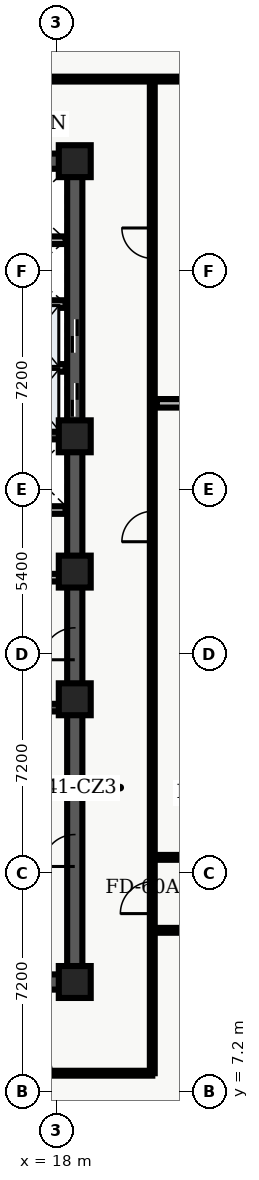
"""IFC4 building model, lengths in metres.
Left out: names, types, materials, properties, quantities, classifications, styles, units other than length and angle.
Written with IfcOpenShell. Run it as: python <this file> out.ifc"""

import sys

from ifc_helpers import new_model, entity, si_unit, converted_unit, direction, frame, origin_with_axes, origin_2d_with_axis, place, context, subcontext, project, spatial, polyline, rectangle, outline, extrude, element, fill, save


model = new_model("IFC4")
c1 = context("Model", 3, precision=1e-05, world=origin_with_axes(), true_north=direction((0.0, 1.0)))
c2 = subcontext(c1, "Body", "Model", "MODEL_VIEW")
j1 = project(units=[si_unit("LENGTHUNIT", "METRE"), converted_unit("PLANEANGLEUNIT", "DEGREE", entity("IfcPlaneAngleMeasure", 0.017), si_unit("PLANEANGLEUNIT", "RADIAN"), dimensions=[0, 0, 0, 0, 0, 0, 0])], contexts=[c1])
p1 = place(None, origin_with_axes())
s1 = spatial("IfcSite", under=j1, at=p1, CompositionType="ELEMENT")
p2 = place(p1, origin_with_axes())
s2 = spatial("IfcBuilding", under=s1, at=p2, CompositionType="ELEMENT")
p3 = place(p2, frame((0.0, 0.0, 168.0), z_axis=(0.0, 0.0, 1.0), x_axis=(1.0, 0.0, 0.0)))
s3 = spatial("IfcBuildingStorey", under=s2, at=p3, CompositionType="ELEMENT", Elevation=168.0)
p4 = place(p3, frame((11.4, 10.8, 0.0), z_axis=(0.0, 0.0, 1.0), x_axis=(1.0, 0.0, 0.0)))
e1 = element("IfcWall", 1, at=p4, inside=s3, PredefinedType="SHEAR", context=c2, shape_type="SweptSolid", body=[
    extrude(outline(polyline([(0.0, -0.25), (7.2, -0.25), (7.2, 0.25), (0.0, 0.25), (0.0, -0.25)])), origin_with_axes(), (0.0, 0.0, 1.0), 3.66),
])
p5 = place(p4, frame((2.625, 0.0, 0.0), z_axis=(0.0, 0.0, 1.0), x_axis=(1.0, 0.0, 0.0)))
e2 = element("IfcOpeningElement", 2, at=p5, cuts=e1, PredefinedType="OPENING", context=c2, shape_type="SweptSolid", body=[
    extrude(rectangle(XDim=1.05, YDim=0.52, at=origin_2d_with_axis()), origin_with_axes(), (0.0, 0.0, 1.0), 2.15),
])
p6 = place(p3, frame((11.4, 37.8, 0.0), z_axis=(0.0, 0.0, 1.0), x_axis=(1.0, 0.0, 0.0)))
e3 = element("IfcWall", 3, at=p6, inside=s3, PredefinedType="SHEAR", context=c2, shape_type="SweptSolid", body=[
    extrude(outline(polyline([(0.0, -0.25), (7.2, -0.25), (7.2, 0.25), (0.0, 0.25), (0.0, -0.25)])), origin_with_axes(), (0.0, 0.0, 1.0), 3.66),
])
p7 = place(p6, frame((2.625, 0.0, 0.0), z_axis=(0.0, 0.0, 1.0), x_axis=(1.0, 0.0, 0.0)))
e4 = element("IfcOpeningElement", 4, at=p7, cuts=e3, PredefinedType="OPENING", context=c2, shape_type="SweptSolid", body=[
    extrude(rectangle(XDim=1.05, YDim=0.52, at=origin_2d_with_axis()), origin_with_axes(), (0.0, 0.0, 1.0), 2.15),
])
p8 = place(p3, frame((18.6, 10.8, 0.0), z_axis=(0.0, 0.0, 1.0), x_axis=(0.0, 1.0, 0.0)))
e5 = element("IfcWall", 5, at=p8, inside=s3, PredefinedType="SHEAR", context=c2, shape_type="SweptSolid", body=[
    extrude(outline(polyline([(0.0, -0.25), (13.5, -0.25), (13.5, 0.25), (0.0, 0.25), (0.0, -0.25)])), origin_with_axes(), (0.0, 0.0, 1.0), 3.66),
])
p9 = place(p8, frame((11.125, 0.0, 0.0), z_axis=(0.0, 0.0, 1.0), x_axis=(1.0, 0.0, 0.0)))
e6 = element("IfcOpeningElement", 6, at=p9, cuts=e5, PredefinedType="OPENING", context=c2, shape_type="SweptSolid", body=[
    extrude(rectangle(XDim=1.05, YDim=0.52, at=origin_2d_with_axis()), origin_with_axes(), (0.0, 0.0, 1.0), 2.15),
])
p10 = place(p8, frame((4.325, 0.0, 0.0), z_axis=(0.0, 0.0, 1.0), x_axis=(1.0, 0.0, 0.0)))
e7 = element("IfcOpeningElement", 7, at=p10, cuts=e5, PredefinedType="OPENING", context=c2, shape_type="SweptSolid", body=[
    extrude(rectangle(XDim=1.05, YDim=0.52, at=origin_2d_with_axis()), origin_with_axes(), (0.0, 0.0, 1.0), 2.15),
])
p11 = place(p3, frame((18.6, 24.3, 0.0), z_axis=(0.0, 0.0, 1.0), x_axis=(0.0, 1.0, 0.0)))
e8 = element("IfcWall", 8, at=p11, inside=s3, PredefinedType="SHEAR", context=c2, shape_type="SweptSolid", body=[
    extrude(outline(polyline([(0.0, -0.25), (13.5, -0.25), (13.5, 0.25), (0.0, 0.25), (0.0, -0.25)])), origin_with_axes(), (0.0, 0.0, 1.0), 3.66),
])
p12 = place(p11, frame((5.65, 0.0, 0.0), z_axis=(0.0, 0.0, 1.0), x_axis=(1.0, 0.0, 0.0)))
e9 = element("IfcOpeningElement", 9, at=p12, cuts=e8, PredefinedType="OPENING", context=c2, shape_type="SweptSolid", body=[
    extrude(rectangle(XDim=1.1, YDim=0.52, at=origin_2d_with_axis()), origin_with_axes(), (0.0, 0.0, 1.0), 2.15),
])
p13 = place(p11, frame((7.75, 0.0, 0.0), z_axis=(0.0, 0.0, 1.0), x_axis=(1.0, 0.0, 0.0)))
e10 = element("IfcOpeningElement", 10, at=p13, cuts=e8, PredefinedType="OPENING", context=c2, shape_type="SweptSolid", body=[
    extrude(rectangle(XDim=1.1, YDim=0.52, at=origin_2d_with_axis()), origin_with_axes(), (0.0, 0.0, 1.0), 2.15),
])
for number, where, z_axis, x_axis in (
    (11, (11.65, 19.825, 0.0), (0.0, 0.0, 1.0), (1.0, 0.0, 0.0)),
    (12, (11.65, 28.775, 0.0), (0.0, 0.0, 1.0), (1.0, 0.0, 0.0)),
):
    element("IfcWall", number, at=place(p3, frame(where, z_axis=z_axis, x_axis=x_axis)), inside=s3, PredefinedType="SHEAR", context=c2, shape_type="SweptSolid", body=[
        extrude(outline(polyline([(0.0, -0.125), (6.7, -0.125), (6.7, 0.125), (0.0, 0.125), (0.0, -0.125)])), origin_with_axes(), (0.0, 0.0, 1.0), 3.66),
    ])
p14 = place(p3, frame((11.7, 24.1, 0.0), z_axis=(0.0, 0.0, 1.0), x_axis=(1.0, 0.0, 0.0)))
e13 = element("IfcWall", 13, at=p14, inside=s3, PredefinedType="SOLIDWALL", context=c2, shape_type="SweptSolid", body=[
    extrude(outline(polyline([(0.0, -0.125), (6.6, -0.125), (6.6, 0.125), (0.0, 0.125), (0.0, -0.125)])), origin_with_axes(), (0.0, 0.0, 1.0), 2.7),
])
p15 = place(p14, frame((3.75, 0.0, 0.0), z_axis=(0.0, 0.0, 1.0), x_axis=(1.0, 0.0, 0.0)))
e14 = element("IfcOpeningElement", 14, at=p15, cuts=e13, PredefinedType="OPENING", context=c2, shape_type="SweptSolid", body=[
    extrude(rectangle(XDim=0.9, YDim=0.27, at=origin_2d_with_axis()), origin_with_axes(), (0.0, 0.0, 1.0), 2.15),
])
p16 = place(p3, frame((11.7, 26.325, 0.0), z_axis=(0.0, 0.0, 1.0), x_axis=(1.0, 0.0, 0.0)))
e15 = element("IfcWall", 15, at=p16, inside=s3, PredefinedType="SOLIDWALL", context=c2, shape_type="SweptSolid", body=[
    extrude(outline(polyline([(0.0, -0.125), (6.6, -0.125), (6.6, 0.125), (0.0, 0.125), (0.0, -0.125)])), origin_with_axes(), (0.0, 0.0, 1.0), 2.7),
])
p17 = place(p16, frame((3.5, 0.0, 0.0), z_axis=(0.0, 0.0, 1.0), x_axis=(1.0, 0.0, 0.0)))
e16 = element("IfcOpeningElement", 16, at=p17, cuts=e15, PredefinedType="OPENING", context=c2, shape_type="SweptSolid", body=[
    extrude(rectangle(XDim=0.9, YDim=0.27, at=origin_2d_with_axis()), origin_with_axes(), (0.0, 0.0, 1.0), 2.15),
])
for number, where, z_axis, x_axis in (
    (17, (18.6, 10.8, 0.0), (0.0, 0.0, 1.0), (1.0, 0.0, 0.0)),
    (18, (18.6, 20.1, 0.0), (0.0, 0.0, 1.0), (1.0, 0.0, 0.0)),
    (19, (18.6, 24.3, 0.0), (0.0, 0.0, 1.0), (1.0, 0.0, 0.0)),
    (20, (18.6, 28.75, 0.0), (0.0, 0.0, 1.0), (1.0, 0.0, 0.0)),
    (21, (18.6, 37.8, 0.0), (0.0, 0.0, 1.0), (1.0, 0.0, 0.0)),
):
    element("IfcColumn", number, at=place(p3, frame(where, z_axis=z_axis, x_axis=x_axis)), inside=s3, PredefinedType="COLUMN", context=c2, shape_type="SweptSolid", body=[
        extrude(rectangle(XDim=1.05, YDim=1.05, at=origin_2d_with_axis()), origin_with_axes(), (0.0, 0.0, 1.0), 3.9),
    ])
for number, where, z_axis, x_axis in (
    (22, (15.84, 31.0, 0.0), (0.0, 0.0, 1.0), (1.0, 0.0, 0.0)),
    (23, (15.84, 33.1, 0.0), (0.0, 0.0, 1.0), (1.0, 0.0, 0.0)),
    (24, (15.84, 35.2, 0.0), (0.0, 0.0, 1.0), (1.0, 0.0, 0.0)),
):
    element("IfcWall", number, at=place(p3, frame(where, z_axis=z_axis, x_axis=x_axis)), inside=s3, PredefinedType="SOLIDWALL", context=c2, shape_type="SweptSolid", body=[
        extrude(outline(polyline([(0.0, -0.125), (2.46, -0.125), (2.46, 0.125), (0.0, 0.125), (0.0, -0.125)])), origin_with_axes(), (0.0, 0.0, 1.0), 2.7),
    ])
p18 = place(p3, frame((2.6, 7.8, 0.0), z_axis=(0.0, 0.0, 1.0), x_axis=(1.0, 0.0, 0.0)))
e25 = element("IfcWall", 25, at=p18, inside=s3, PredefinedType="PARTITIONING", context=c2, shape_type="SweptSolid", body=[
    extrude(outline(polyline([(0.0, -0.08), (18.55, -0.08), (18.55, 0.08), (0.0, 0.08), (0.0, -0.08)])), origin_with_axes(), (0.0, 0.0, 1.0), 2.7),
])
p19 = place(p18, frame((2.551, 0.0, 0.0), z_axis=(0.0, 0.0, 1.0), x_axis=(1.0, 0.0, 0.0)))
e26 = element("IfcOpeningElement", 26, at=p19, cuts=e25, PredefinedType="OPENING", context=c2, shape_type="SweptSolid", body=[
    extrude(rectangle(XDim=1.0, YDim=0.18, at=origin_2d_with_axis()), origin_with_axes(), (0.0, 0.0, 1.0), 2.15),
])
p20 = place(p18, frame((8.065, 0.0, 0.0), z_axis=(0.0, 0.0, 1.0), x_axis=(1.0, 0.0, 0.0)))
e27 = element("IfcOpeningElement", 27, at=p20, cuts=e25, PredefinedType="OPENING", context=c2, shape_type="SweptSolid", body=[
    extrude(rectangle(XDim=1.0, YDim=0.18, at=origin_2d_with_axis()), origin_with_axes(), (0.0, 0.0, 1.0), 2.15),
])
p21 = place(p18, frame((14.758, 0.0, 0.0), z_axis=(0.0, 0.0, 1.0), x_axis=(1.0, 0.0, 0.0)))
e28 = element("IfcOpeningElement", 28, at=p21, cuts=e25, PredefinedType="OPENING", context=c2, shape_type="SweptSolid", body=[
    extrude(rectangle(XDim=1.0, YDim=0.18, at=origin_2d_with_axis()), origin_with_axes(), (0.0, 0.0, 1.0), 2.15),
])
p22 = place(p3, frame((2.6, 40.5, 0.0), z_axis=(0.0, 0.0, 1.0), x_axis=(1.0, 0.0, 0.0)))
e29 = element("IfcWall", 29, at=p22, inside=s3, PredefinedType="PARTITIONING", context=c2, shape_type="SweptSolid", body=[
    extrude(outline(polyline([(0.0, -0.08), (21.324, -0.08), (21.324, 0.08), (0.0, 0.08), (0.0, -0.08)])), origin_with_axes(), (0.0, 0.0, 1.0), 2.7),
])
p23 = place(p22, frame((4.395, 0.0, 0.0), z_axis=(0.0, 0.0, 1.0), x_axis=(1.0, 0.0, 0.0)))
e30 = element("IfcOpeningElement", 30, at=p23, cuts=e29, PredefinedType="OPENING", context=c2, shape_type="SweptSolid", body=[
    extrude(rectangle(XDim=1.2, YDim=0.18, at=origin_2d_with_axis()), origin_with_axes(), (0.0, 0.0, 1.0), 2.2),
])
p24 = place(p22, frame((13.16, 0.0, 0.0), z_axis=(0.0, 0.0, 1.0), x_axis=(1.0, 0.0, 0.0)))
e31 = element("IfcOpeningElement", 31, at=p24, cuts=e29, PredefinedType="OPENING", context=c2, shape_type="SweptSolid", body=[
    extrude(rectangle(XDim=1.0, YDim=0.18, at=origin_2d_with_axis()), origin_with_axes(), (0.0, 0.0, 1.0), 2.15),
])
p25 = place(p3, frame((21.15, 7.8, 0.0), z_axis=(0.0, 0.0, 1.0), x_axis=(0.0, 1.0, 0.0)))
e32 = element("IfcWall", 32, at=p25, inside=s3, PredefinedType="PARTITIONING", context=c2, shape_type="SweptSolid", body=[
    extrude(outline(polyline([(0.0, -0.08), (32.7, -0.08), (32.7, 0.08), (0.0, 0.08), (0.0, -0.08)])), origin_with_axes(), (0.0, 0.0, 1.0), 2.7),
])
p26 = place(p25, frame((17.983, 0.0, 0.0), z_axis=(0.0, 0.0, 1.0), x_axis=(1.0, 0.0, 0.0)))
e33 = element("IfcOpeningElement", 33, at=p26, cuts=e32, PredefinedType="OPENING", context=c2, shape_type="SweptSolid", body=[
    extrude(rectangle(XDim=1.0, YDim=0.18, at=origin_2d_with_axis()), origin_with_axes(), (0.0, 0.0, 1.0), 2.15),
])
p27 = place(p25, frame((27.302, 0.0, 0.0), z_axis=(0.0, 0.0, 1.0), x_axis=(1.0, 0.0, 0.0)))
e34 = element("IfcOpeningElement", 34, at=p27, cuts=e32, PredefinedType="OPENING", context=c2, shape_type="SweptSolid", body=[
    extrude(rectangle(XDim=1.0, YDim=0.18, at=origin_2d_with_axis()), origin_with_axes(), (0.0, 0.0, 1.0), 2.15),
])
p28 = place(p25, frame((5.775, 0.0, 0.0), z_axis=(0.0, 0.0, 1.0), x_axis=(1.0, 0.0, 0.0)))
e35 = element("IfcOpeningElement", 35, at=p28, cuts=e32, PredefinedType="OPENING", context=c2, shape_type="SweptSolid", body=[
    extrude(rectangle(XDim=1.05, YDim=0.18, at=origin_2d_with_axis()), origin_with_axes(), (0.0, 0.0, 1.0), 2.15),
])
p29 = place(p3, frame((21.3, 29.835, 0.0), z_axis=(0.0, 0.0, 1.0), x_axis=(1.0, 0.0, 0.0)))
e36 = element("IfcWall", 36, at=p29, inside=s3, PredefinedType="PARTITIONING", context=c2, shape_type="SweptSolid", body=[
    extrude(outline(polyline([(0.0, -0.14), (2.624, -0.14), (2.624, 0.14), (0.0, 0.14), (0.0, -0.14)])), origin_with_axes(), (0.0, 0.0, 1.0), 2.7),
])
p30 = place(p3, frame((21.15, 12.5, 0.0), z_axis=(0.0, 0.0, 1.0), x_axis=(1.0, 0.0, 0.0)))
e37 = element("IfcWall", 37, at=p30, inside=s3, PredefinedType="PARTITIONING", context=c2, shape_type="SweptSolid", body=[
    extrude(outline(polyline([(0.0, -0.08), (15.2, -0.08), (15.2, 0.08), (0.0, 0.08), (0.0, -0.08)])), origin_with_axes(), (0.0, 0.0, 1.0), 2.7),
])
p31 = place(p30, frame((3.47, 0.0, 0.0), z_axis=(0.0, 0.0, 1.0), x_axis=(1.0, 0.0, 0.0)))
e38 = element("IfcOpeningElement", 38, at=p31, cuts=e37, PredefinedType="OPENING", context=c2, shape_type="SweptSolid", body=[
    extrude(rectangle(XDim=1.0, YDim=0.18, at=origin_2d_with_axis()), origin_with_axes(), (0.0, 0.0, 1.0), 2.15),
])
p32 = place(p30, frame((10.94, 0.0, 0.0), z_axis=(0.0, 0.0, 1.0), x_axis=(1.0, 0.0, 0.0)))
e39 = element("IfcOpeningElement", 39, at=p32, cuts=e37, PredefinedType="OPENING", context=c2, shape_type="SweptSolid", body=[
    extrude(rectangle(XDim=1.0, YDim=0.18, at=origin_2d_with_axis()), origin_with_axes(), (0.0, 0.0, 1.0), 2.15),
])
p33 = place(p3, frame((21.15, 14.9, 0.0), z_axis=(0.0, 0.0, 1.0), x_axis=(1.0, 0.0, 0.0)))
e40 = element("IfcWall", 40, at=p33, inside=s3, PredefinedType="PARTITIONING", context=c2, shape_type="SweptSolid", body=[
    extrude(outline(polyline([(0.0, -0.08), (15.2, -0.08), (15.2, 0.08), (0.0, 0.08), (0.0, -0.08)])), origin_with_axes(), (0.0, 0.0, 1.0), 2.7),
])
p34 = place(p33, frame((2.563, 0.0, 0.0), z_axis=(0.0, 0.0, 1.0), x_axis=(1.0, 0.0, 0.0)))
e41 = element("IfcOpeningElement", 41, at=p34, cuts=e40, PredefinedType="OPENING", context=c2, shape_type="SweptSolid", body=[
    extrude(rectangle(XDim=1.0, YDim=0.18, at=origin_2d_with_axis()), origin_with_axes(), (0.0, 0.0, 1.0), 2.15),
])
p35 = place(p33, frame((6.457, 0.0, 0.0), z_axis=(0.0, 0.0, 1.0), x_axis=(1.0, 0.0, 0.0)))
e42 = element("IfcOpeningElement", 42, at=p35, cuts=e40, PredefinedType="OPENING", context=c2, shape_type="SweptSolid", body=[
    extrude(rectangle(XDim=1.0, YDim=0.18, at=origin_2d_with_axis()), origin_with_axes(), (0.0, 0.0, 1.0), 2.15),
])
p36 = place(p33, frame((9.627, 0.0, 0.0), z_axis=(0.0, 0.0, 1.0), x_axis=(1.0, 0.0, 0.0)))
e43 = element("IfcOpeningElement", 43, at=p36, cuts=e40, PredefinedType="OPENING", context=c2, shape_type="SweptSolid", body=[
    extrude(rectangle(XDim=1.0, YDim=0.18, at=origin_2d_with_axis()), origin_with_axes(), (0.0, 0.0, 1.0), 2.15),
])
p37 = place(p33, frame((13.204, 0.0, 0.0), z_axis=(0.0, 0.0, 1.0), x_axis=(1.0, 0.0, 0.0)))
e44 = element("IfcOpeningElement", 44, at=p37, cuts=e40, PredefinedType="OPENING", context=c2, shape_type="SweptSolid", body=[
    extrude(rectangle(XDim=1.0, YDim=0.18, at=origin_2d_with_axis()), origin_with_axes(), (0.0, 0.0, 1.0), 2.15),
])
p38 = place(p11, frame((5.65, 0.0, 0.0), z_axis=(0.0, 0.0, 1.0), x_axis=(1.0, 0.0, 0.0)))
e45 = element("IfcDoor", 45, at=p38, inside=s3, OperationType="SLIDING_TO_LEFT", PredefinedType="DOOR", context=c2, shape_type="SweptSolid", body=[
    extrude(rectangle(XDim=1.1, YDim=0.09, at=origin_2d_with_axis()), origin_with_axes(), (0.0, 0.0, 1.0), 2.15),
])
fill(e9, e45)
p39 = place(p11, frame((7.75, 0.0, 0.0), z_axis=(0.0, 0.0, 1.0), x_axis=(1.0, 0.0, 0.0)))
e46 = element("IfcDoor", 46, at=p39, inside=s3, OperationType="SLIDING_TO_RIGHT", PredefinedType="DOOR", context=c2, shape_type="SweptSolid", body=[
    extrude(rectangle(XDim=1.1, YDim=0.09, at=origin_2d_with_axis()), origin_with_axes(), (0.0, 0.0, 1.0), 2.15),
])
fill(e10, e46)
p40 = place(p8, frame((11.125, 0.0, 0.0), z_axis=(0.0, 0.0, 1.0), x_axis=(1.0, 0.0, 0.0)))
e47 = element("IfcDoor", 47, at=p40, inside=s3, OperationType="SINGLE_SWING_LEFT", PredefinedType="DOOR", context=c2, shape_type="SweptSolid", body=[
    extrude(rectangle(XDim=1.05, YDim=0.09, at=origin_2d_with_axis()), origin_with_axes(), (0.0, 0.0, 1.0), 2.15),
])
fill(e6, e47)
p41 = place(p8, frame((4.325, 0.0, 0.0), z_axis=(0.0, 0.0, 1.0), x_axis=(1.0, 0.0, 0.0)))
e48 = element("IfcDoor", 48, at=p41, inside=s3, OperationType="SINGLE_SWING_LEFT", PredefinedType="DOOR", context=c2, shape_type="SweptSolid", body=[
    extrude(rectangle(XDim=1.05, YDim=0.09, at=origin_2d_with_axis()), origin_with_axes(), (0.0, 0.0, 1.0), 2.15),
])
fill(e7, e48)
p42 = place(p18, frame((14.758, 0.0, 0.0), z_axis=(0.0, 0.0, 1.0), x_axis=(1.0, 0.0, 0.0)))
e49 = element("IfcDoor", 49, at=p42, inside=s3, OperationType="SINGLE_SWING_LEFT", PredefinedType="DOOR", context=c2, shape_type="SweptSolid", body=[
    extrude(rectangle(XDim=1.0, YDim=0.09, at=origin_2d_with_axis()), origin_with_axes(), (0.0, 0.0, 1.0), 2.15),
])
fill(e28, e49)
p43 = place(p25, frame((17.983, 0.0, 0.0), z_axis=(0.0, 0.0, 1.0), x_axis=(1.0, 0.0, 0.0)))
e50 = element("IfcDoor", 50, at=p43, inside=s3, OperationType="SINGLE_SWING_LEFT", PredefinedType="DOOR", context=c2, shape_type="SweptSolid", body=[
    extrude(rectangle(XDim=1.0, YDim=0.09, at=origin_2d_with_axis()), origin_with_axes(), (0.0, 0.0, 1.0), 2.15),
])
fill(e33, e50)
p44 = place(p25, frame((27.302, 0.0, 0.0), z_axis=(0.0, 0.0, 1.0), x_axis=(1.0, 0.0, 0.0)))
e51 = element("IfcDoor", 51, at=p44, inside=s3, OperationType="SINGLE_SWING_RIGHT", PredefinedType="DOOR", context=c2, shape_type="SweptSolid", body=[
    extrude(rectangle(XDim=1.0, YDim=0.09, at=origin_2d_with_axis()), origin_with_axes(), (0.0, 0.0, 1.0), 2.15),
])
fill(e34, e51)
p45 = place(p25, frame((5.775, 0.0, 0.0), z_axis=(0.0, 0.0, 1.0), x_axis=(1.0, 0.0, 0.0)))
e52 = element("IfcDoor", 52, at=p45, inside=s3, OperationType="SINGLE_SWING_LEFT", PredefinedType="DOOR", context=c2, shape_type="SweptSolid", body=[
    extrude(rectangle(XDim=1.05, YDim=0.09, at=origin_2d_with_axis()), origin_with_axes(), (0.0, 0.0, 1.0), 2.15),
])
fill(e35, e52)
save(model, sys.argv[1])
